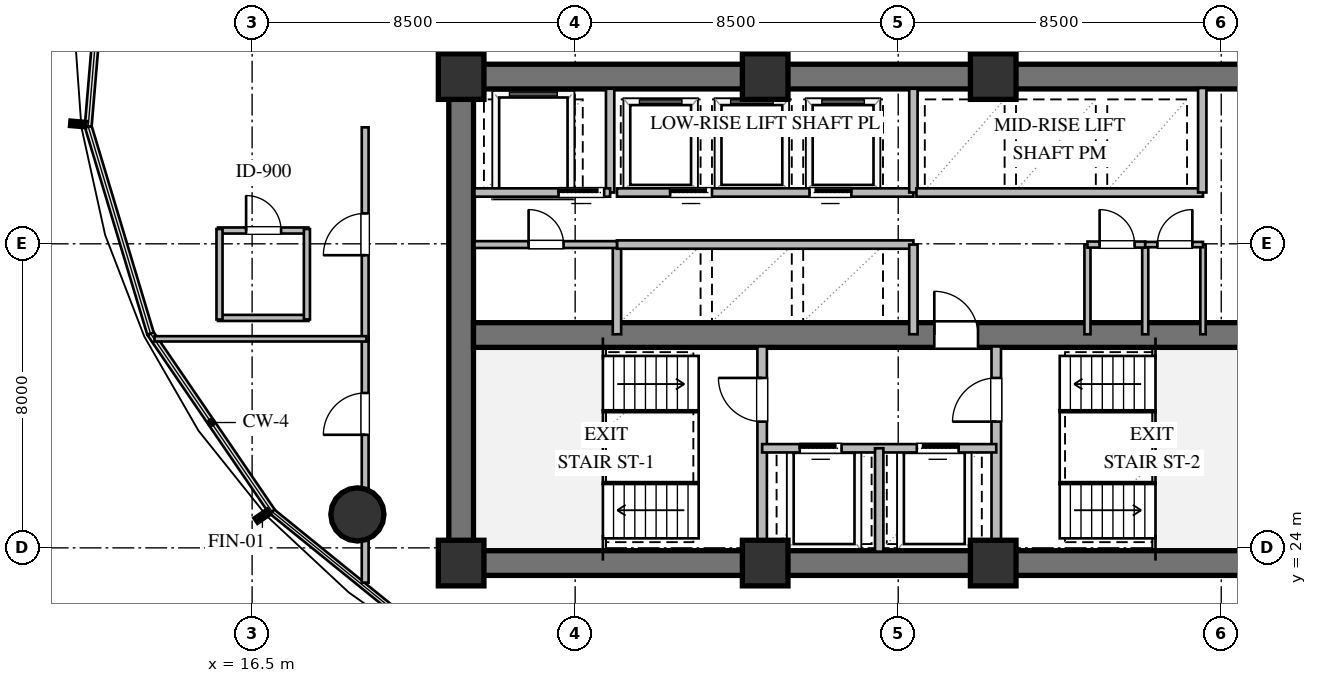
"""IFC4 building model, lengths in metres.
Left out: names, types, materials, properties, quantities, classifications, styles, units other than length and angle.
Written with IfcOpenShell. Run it as: python <this file> out.ifc"""

import sys

from ifc_helpers import new_model, si_unit, direction, frame, frame_2d, origin, origin_2d, place, context, subcontext, project, spatial, rectangle, circle, extrude, element, fill, save


model = new_model("IFC4")
c1 = context("Model", 3, precision=1e-05, world=origin(), true_north=direction((0.0, 1.0)))
c2 = subcontext(c1, "Body", "Model", "MODEL_VIEW")
j1 = project(units=[si_unit("LENGTHUNIT", "METRE"), si_unit("PLANEANGLEUNIT", "RADIAN")], contexts=[c1])
p1 = place(None, origin())
s1 = spatial("IfcSite", under=j1, at=p1, CompositionType="ELEMENT")
p2 = place(p1, origin())
s2 = spatial("IfcBuilding", under=s1, at=p2, CompositionType="ELEMENT")
p3 = place(p2, frame((0.0, 0.0, 74.4)))
s3 = spatial("IfcBuildingStorey", under=s2, at=p3, CompositionType="ELEMENT", Elevation=74.4)
for number, where, z_axis, x_axis in (
    (1, (21.675, 23.6, 0.0), (0.0, 0.0, 1.0), (1.0, 0.0, 0.0)),
    (2, (21.675, 36.4, 0.0), (0.0, 0.0, 1.0), (1.0, 0.0, 0.0)),
):
    element("IfcWall", number, at=place(p3, frame(where, z_axis=z_axis, x_axis=x_axis)), inside=s3, PredefinedType="SHEAR", context=c2, shape_type="SweptSolid", body=[
        extrude(rectangle(XDim=22.65, YDim=0.65, at=frame_2d((11.325, 0.0))), origin(), (0.0, 0.0, 1.0), 3.36),
    ])
p4 = place(p3, frame((22.0, 23.925, 0.0), z_axis=(0.0, 0.0, 1.0), x_axis=(0.0, 1.0, 0.0)))
e3 = element("IfcWall", 3, at=p4, inside=s3, PredefinedType="SHEAR", context=c2, shape_type="SweptSolid", body=[
    extrude(rectangle(XDim=12.15, YDim=0.65, at=frame_2d((6.075, 0.0))), origin(), (0.0, 0.0, 1.0), 3.36),
])
p5 = place(p3, frame((22.325, 29.6, 0.0), z_axis=(0.0, 0.0, 1.0), x_axis=(1.0, 0.0, 0.0)))
e4 = element("IfcWall", 4, at=p5, inside=s3, PredefinedType="SHEAR", context=c2, shape_type="SweptSolid", body=[
    extrude(rectangle(XDim=21.35, YDim=0.65, at=frame_2d((10.675, 0.0))), origin(), (0.0, 0.0, 1.0), 3.36),
])
p6 = place(p5, frame((12.125, 0.0, 0.0)))
e5 = element("IfcOpeningElement", 5, at=p6, cuts=e4, PredefinedType="OPENING", context=c2, shape_type="SweptSolid", body=[
    extrude(rectangle(XDim=1.15, YDim=2.1, at=frame_2d((0.575, 1.05))), frame((0.0, 0.335, 0.0), z_axis=(0.0, -1.0, 0.0), x_axis=(1.0, 0.0, 0.0)), (0.0, 0.0, 1.0), 0.67),
])
for number, where, z_axis, x_axis in (
    (6, (22.0, 23.6, 0.0), (0.0, 0.0, 1.0), (1.0, 0.0, 0.0)),
    (7, (30.0, 23.6, 0.0), (0.0, 0.0, 1.0), (1.0, 0.0, 0.0)),
    (8, (36.0, 23.6, 0.0), (0.0, 0.0, 1.0), (1.0, 0.0, 0.0)),
    (9, (36.0, 36.4, 0.0), (0.0, 0.0, 1.0), (1.0, 0.0, 0.0)),
    (10, (30.0, 36.4, 0.0), (0.0, 0.0, 1.0), (1.0, 0.0, 0.0)),
    (11, (22.0, 36.4, 0.0), (0.0, 0.0, 1.0), (1.0, 0.0, 0.0)),
):
    element("IfcColumn", number, at=place(p3, frame(where, z_axis=z_axis, x_axis=x_axis)), inside=s3, PredefinedType="COLUMN", context=c2, shape_type="SweptSolid", body=[
        extrude(rectangle(XDim=1.2, YDim=1.2, at=origin_2d()), origin(), (0.0, 0.0, 1.0), 3.6),
    ])
p7 = place(p3, frame((19.27, 24.88, 0.0), z_axis=(0.0, 0.0, 1.0), x_axis=(1.0, 0.0, 0.0)))
e12 = element("IfcColumn", 12, at=p7, inside=s3, PredefinedType="COLUMN", context=c2, shape_type="SweptSolid", body=[
    extrude(circle(Radius=0.7, at=origin_2d()), origin(), (0.0, 0.0, 1.0), 3.6),
])
p8 = place(p3, frame((29.92, 23.9, 0.0), z_axis=(0.0, 0.0, 1.0), x_axis=(0.0, 1.0, 0.0)))
e13 = element("IfcWall", 13, at=p8, inside=s3, PredefinedType="SOLIDWALL", context=c2, shape_type="SweptSolid", body=[
    extrude(rectangle(XDim=5.4, YDim=0.25, at=frame_2d((2.7, 0.0))), origin(), (0.0, 0.0, 1.0), 3.36),
])
p9 = place(p8, frame((3.421, 0.0, 0.0)))
e14 = element("IfcOpeningElement", 14, at=p9, cuts=e13, PredefinedType="OPENING", context=c2, shape_type="SweptSolid", body=[
    extrude(rectangle(XDim=1.15, YDim=2.1, at=frame_2d((0.575, 1.05))), frame((0.0, 0.135, 0.0), z_axis=(0.0, -1.0, 0.0), x_axis=(1.0, 0.0, 0.0)), (0.0, 0.0, 1.0), 0.27),
])
p10 = place(p3, frame((36.08, 23.9, 0.0), z_axis=(0.0, 0.0, 1.0), x_axis=(0.0, 1.0, 0.0)))
e15 = element("IfcWall", 15, at=p10, inside=s3, PredefinedType="SOLIDWALL", context=c2, shape_type="SweptSolid", body=[
    extrude(rectangle(XDim=5.4, YDim=0.25, at=frame_2d((2.7, 0.0))), origin(), (0.0, 0.0, 1.0), 3.36),
])
p11 = place(p10, frame((3.421, 0.0, 0.0)))
e16 = element("IfcOpeningElement", 16, at=p11, cuts=e15, PredefinedType="OPENING", context=c2, shape_type="SweptSolid", body=[
    extrude(rectangle(XDim=1.15, YDim=2.1, at=frame_2d((0.575, 1.05))), frame((0.0, 0.135, 0.0), z_axis=(0.0, -1.0, 0.0), x_axis=(1.0, 0.0, 0.0)), (0.0, 0.0, 1.0), 0.27),
])
p12 = place(p3, frame((29.92, 26.62, 0.0), z_axis=(0.0, 0.0, 1.0), x_axis=(1.0, 0.0, 0.0)))
e17 = element("IfcWall", 17, at=p12, inside=s3, PredefinedType="SOLIDWALL", context=c2, shape_type="SweptSolid", body=[
    extrude(rectangle(XDim=6.16, YDim=0.22, at=frame_2d((3.08, 0.0))), origin(), (0.0, 0.0, 1.0), 3.36),
])
p13 = place(p12, frame((0.99, 0.0, 0.0)))
e18 = element("IfcOpeningElement", 18, at=p13, cuts=e17, PredefinedType="OPENING", context=c2, shape_type="SweptSolid", body=[
    extrude(rectangle(XDim=1.1, YDim=2.1, at=frame_2d((0.55, 1.05))), frame((0.0, 0.12, 0.0), z_axis=(0.0, -1.0, 0.0), x_axis=(1.0, 0.0, 0.0)), (0.0, 0.0, 1.0), 0.24),
])
p14 = place(p12, frame((4.07, 0.0, 0.0)))
e19 = element("IfcOpeningElement", 19, at=p14, cuts=e17, PredefinedType="OPENING", context=c2, shape_type="SweptSolid", body=[
    extrude(rectangle(XDim=1.1, YDim=2.1, at=frame_2d((0.55, 1.05))), frame((0.0, 0.12, 0.0), z_axis=(0.0, -1.0, 0.0), x_axis=(1.0, 0.0, 0.0)), (0.0, 0.0, 1.0), 0.24),
])
p15 = place(p3, frame((33.0, 23.9, 0.0), z_axis=(0.0, 0.0, 1.0), x_axis=(0.0, 1.0, 0.0)))
e20 = element("IfcWall", 20, at=p15, inside=s3, PredefinedType="SOLIDWALL", context=c2, shape_type="SweptSolid", body=[
    extrude(rectangle(XDim=2.72, YDim=0.22, at=frame_2d((1.36, 0.0))), origin(), (0.0, 0.0, 1.0), 3.36),
])
p16 = place(p3, frame((25.92, 33.35, 0.0), z_axis=(0.0, 0.0, 1.0), x_axis=(0.0, 1.0, 0.0)))
e21 = element("IfcWall", 21, at=p16, inside=s3, PredefinedType="SOLIDWALL", context=c2, shape_type="SweptSolid", body=[
    extrude(rectangle(XDim=2.73, YDim=0.22, at=frame_2d((1.365, 0.0))), origin(), (0.0, 0.0, 1.0), 3.36),
])
p17 = place(p3, frame((22.35, 33.35, 0.0), z_axis=(0.0, 0.0, 1.0), x_axis=(1.0, 0.0, 0.0)))
e22 = element("IfcWall", 22, at=p17, inside=s3, PredefinedType="SOLIDWALL", context=c2, shape_type="SweptSolid", body=[
    extrude(rectangle(XDim=3.57, YDim=0.22, at=frame_2d((1.785, 0.0))), origin(), (0.0, 0.0, 1.0), 3.36),
])
p18 = place(p17, frame((2.213, 0.0, 0.0)))
e23 = element("IfcOpeningElement", 23, at=p18, cuts=e22, PredefinedType="OPENING", context=c2, shape_type="SweptSolid", body=[
    extrude(rectangle(XDim=1.2, YDim=2.1, at=frame_2d((0.6, 1.05))), frame((0.0, 0.12, 0.0), z_axis=(0.0, -1.0, 0.0), x_axis=(1.0, 0.0, 0.0)), (0.0, 0.0, 1.0), 0.24),
])
p19 = place(p3, frame((26.1, 29.62, 0.0), z_axis=(0.0, 0.0, 1.0), x_axis=(0.0, 1.0, 0.0)))
e24 = element("IfcWall", 24, at=p19, inside=s3, PredefinedType="SOLIDWALL", context=c2, shape_type="SweptSolid", body=[
    extrude(rectangle(XDim=2.36, YDim=0.22, at=frame_2d((1.18, 0.0))), origin(), (0.0, 0.0, 1.0), 3.36),
])
p20 = place(p3, frame((26.1, 31.98, 0.0), z_axis=(0.0, 0.0, 1.0), x_axis=(1.0, 0.0, 0.0)))
e25 = element("IfcWall", 25, at=p20, inside=s3, PredefinedType="SOLIDWALL", context=c2, shape_type="SweptSolid", body=[
    extrude(rectangle(XDim=7.8, YDim=0.22, at=frame_2d((3.9, 0.0))), origin(), (0.0, 0.0, 1.0), 3.36),
])
p21 = place(p3, frame((33.9, 29.62, 0.0), z_axis=(0.0, 0.0, 1.0), x_axis=(0.0, 1.0, 0.0)))
e26 = element("IfcWall", 26, at=p21, inside=s3, PredefinedType="SOLIDWALL", context=c2, shape_type="SweptSolid", body=[
    extrude(rectangle(XDim=2.36, YDim=0.22, at=frame_2d((1.18, 0.0))), origin(), (0.0, 0.0, 1.0), 3.36),
])
p22 = place(p3, frame((26.1, 33.35, 0.0), z_axis=(0.0, 0.0, 1.0), x_axis=(1.0, 0.0, 0.0)))
e27 = element("IfcWall", 27, at=p22, inside=s3, PredefinedType="SOLIDWALL", context=c2, shape_type="SweptSolid", body=[
    extrude(rectangle(XDim=7.8, YDim=0.22, at=frame_2d((3.9, 0.0))), origin(), (0.0, 0.0, 1.0), 3.36),
])
p23 = place(p22, frame((1.4, 0.0, 0.0)))
e28 = element("IfcOpeningElement", 28, at=p23, cuts=e27, PredefinedType="OPENING", context=c2, shape_type="SweptSolid", body=[
    extrude(rectangle(XDim=1.1, YDim=2.1, at=frame_2d((0.55, 1.05))), frame((0.0, 0.12, 0.0), z_axis=(0.0, -1.0, 0.0), x_axis=(1.0, 0.0, 0.0)), (0.0, 0.0, 1.0), 0.24),
])
p24 = place(p22, frame((5.066, 0.0, 0.0)))
e29 = element("IfcOpeningElement", 29, at=p24, cuts=e27, PredefinedType="OPENING", context=c2, shape_type="SweptSolid", body=[
    extrude(rectangle(XDim=1.1, YDim=2.1, at=frame_2d((0.55, 1.05))), frame((0.0, 0.12, 0.0), z_axis=(0.0, -1.0, 0.0), x_axis=(1.0, 0.0, 0.0)), (0.0, 0.0, 1.0), 0.24),
])
p25 = place(p3, frame((33.9, 33.35, 0.0), z_axis=(0.0, 0.0, 1.0), x_axis=(0.0, 1.0, 0.0)))
e30 = element("IfcWall", 30, at=p25, inside=s3, PredefinedType="SOLIDWALL", context=c2, shape_type="SweptSolid", body=[
    extrude(rectangle(XDim=2.73, YDim=0.22, at=frame_2d((1.365, 0.0))), origin(), (0.0, 0.0, 1.0), 3.36),
])
p26 = place(p3, frame((33.98, 33.35, 0.0), z_axis=(0.0, 0.0, 1.0), x_axis=(1.0, 0.0, 0.0)))
e31 = element("IfcWall", 31, at=p26, inside=s3, PredefinedType="SOLIDWALL", context=c2, shape_type="SweptSolid", body=[
    extrude(rectangle(XDim=7.54, YDim=0.22, at=frame_2d((3.77, 0.0))), origin(), (0.0, 0.0, 1.0), 3.36),
])
p27 = place(p3, frame((41.5, 33.35, 0.0), z_axis=(0.0, 0.0, 1.0), x_axis=(0.0, 1.0, 0.0)))
e32 = element("IfcWall", 32, at=p27, inside=s3, PredefinedType="SOLIDWALL", context=c2, shape_type="SweptSolid", body=[
    extrude(rectangle(XDim=2.75, YDim=0.22, at=frame_2d((1.375, 0.0))), origin(), (0.0, 0.0, 1.0), 3.36),
])
p28 = place(p3, frame((22.35, 31.98, 0.0), z_axis=(0.0, 0.0, 1.0), x_axis=(1.0, 0.0, 0.0)))
e33 = element("IfcWall", 33, at=p28, inside=s3, PredefinedType="PARTITIONING", context=c2, shape_type="SweptSolid", body=[
    extrude(rectangle(XDim=3.75, YDim=0.18, at=frame_2d((1.875, 0.0))), origin(), (0.0, 0.0, 1.0), 3.36),
])
p29 = place(p28, frame((1.425, 0.0, 0.0)))
e34 = element("IfcOpeningElement", 34, at=p29, cuts=e33, PredefinedType="OPENING", context=c2, shape_type="SweptSolid", body=[
    extrude(rectangle(XDim=0.92, YDim=2.1, at=frame_2d((0.46, 1.05))), frame((0.0, 0.1, 0.0), z_axis=(0.0, -1.0, 0.0), x_axis=(1.0, 0.0, 0.0)), (0.0, 0.0, 1.0), 0.2),
])
for number, where, z_axis, x_axis in (
    (35, (38.48, 29.62, 0.0), (0.0, 0.0, 1.0), (0.0, 1.0, 0.0)),
    (36, (40.0, 29.62, 0.0), (0.0, 0.0, 1.0), (0.0, 1.0, 0.0)),
):
    element("IfcWall", number, at=place(p3, frame(where, z_axis=z_axis, x_axis=x_axis)), inside=s3, PredefinedType="PLUMBINGWALL", context=c2, shape_type="SweptSolid", body=[
        extrude(rectangle(XDim=2.36, YDim=0.16, at=frame_2d((1.18, 0.0))), origin(), (0.0, 0.0, 1.0), 3.36),
    ])
p30 = place(p3, frame((41.52, 29.62, 0.0), z_axis=(0.0, 0.0, 1.0), x_axis=(0.0, 1.0, 0.0)))
e37 = element("IfcWall", 37, at=p30, inside=s3, PredefinedType="PARTITIONING", context=c2, shape_type="SweptSolid", body=[
    extrude(rectangle(XDim=2.36, YDim=0.14, at=frame_2d((1.18, 0.0))), origin(), (0.0, 0.0, 1.0), 3.36),
])
p31 = place(p3, frame((38.48, 31.98, 0.0), z_axis=(0.0, 0.0, 1.0), x_axis=(1.0, 0.0, 0.0)))
e38 = element("IfcWall", 38, at=p31, inside=s3, PredefinedType="PLUMBINGWALL", context=c2, shape_type="SweptSolid", body=[
    extrude(rectangle(XDim=1.52, YDim=0.16, at=frame_2d((0.76, 0.0))), origin(), (0.0, 0.0, 1.0), 3.36),
])
p32 = place(p31, frame((0.32, 0.0, 0.0)))
e39 = element("IfcOpeningElement", 39, at=p32, cuts=e38, PredefinedType="OPENING", context=c2, shape_type="SweptSolid", body=[
    extrude(rectangle(XDim=0.92, YDim=2.1, at=frame_2d((0.46, 1.05))), frame((0.0, 0.09, 0.0), z_axis=(0.0, -1.0, 0.0), x_axis=(1.0, 0.0, 0.0)), (0.0, 0.0, 1.0), 0.18),
])
p33 = place(p3, frame((40.0, 31.98, 0.0), z_axis=(0.0, 0.0, 1.0), x_axis=(1.0, 0.0, 0.0)))
e40 = element("IfcWall", 40, at=p33, inside=s3, PredefinedType="PARTITIONING", context=c2, shape_type="SweptSolid", body=[
    extrude(rectangle(XDim=1.52, YDim=0.14, at=frame_2d((0.76, 0.0))), origin(), (0.0, 0.0, 1.0), 3.36),
])
p34 = place(p33, frame((0.32, 0.0, 0.0)))
e41 = element("IfcOpeningElement", 41, at=p34, cuts=e40, PredefinedType="OPENING", context=c2, shape_type="SweptSolid", body=[
    extrude(rectangle(XDim=0.92, YDim=2.1, at=frame_2d((0.46, 1.05))), frame((0.0, 0.08, 0.0), z_axis=(0.0, -1.0, 0.0), x_axis=(1.0, 0.0, 0.0)), (0.0, 0.0, 1.0), 0.16),
])
p35 = place(p3, frame((15.602, 30.05, 0.0), z_axis=(0.0, 0.0, 1.0), x_axis=(1.0, 0.0, 0.0)))
e42 = element("IfcWall", 42, at=p35, inside=s3, PredefinedType="PLUMBINGWALL", context=c2, shape_type="SweptSolid", body=[
    extrude(rectangle(XDim=2.38, YDim=0.16, at=frame_2d((1.19, 0.0))), origin(), (0.0, 0.0, 1.0), 3.36),
])
p36 = place(p3, frame((15.602, 32.35, 0.0), z_axis=(0.0, 0.0, 1.0), x_axis=(1.0, 0.0, 0.0)))
e43 = element("IfcWall", 43, at=p36, inside=s3, PredefinedType="PLUMBINGWALL", context=c2, shape_type="SweptSolid", body=[
    extrude(rectangle(XDim=2.38, YDim=0.16, at=frame_2d((1.19, 0.0))), origin(), (0.0, 0.0, 1.0), 3.36),
])
p37 = place(p36, frame((0.74, 0.0, 0.0)))
e44 = element("IfcOpeningElement", 44, at=p37, cuts=e43, PredefinedType="OPENING", context=c2, shape_type="SweptSolid", body=[
    extrude(rectangle(XDim=0.92, YDim=2.1, at=frame_2d((0.46, 1.05))), frame((0.0, 0.09, 0.0), z_axis=(0.0, -1.0, 0.0), x_axis=(1.0, 0.0, 0.0)), (0.0, 0.0, 1.0), 0.18),
])
p38 = place(p3, frame((15.642, 30.01, 0.0), z_axis=(0.0, 0.0, 1.0), x_axis=(0.0, 1.0, 0.0)))
e45 = element("IfcWall", 45, at=p38, inside=s3, PredefinedType="PLUMBINGWALL", context=c2, shape_type="SweptSolid", body=[
    extrude(rectangle(XDim=2.38, YDim=0.16, at=frame_2d((1.19, 0.0))), origin(), (0.0, 0.0, 1.0), 3.36),
])
p39 = place(p3, frame((17.942, 30.01, 0.0), z_axis=(0.0, 0.0, 1.0), x_axis=(0.0, 1.0, 0.0)))
e46 = element("IfcWall", 46, at=p39, inside=s3, PredefinedType="PLUMBINGWALL", context=c2, shape_type="SweptSolid", body=[
    extrude(rectangle(XDim=2.38, YDim=0.16, at=frame_2d((1.19, 0.0))), origin(), (0.0, 0.0, 1.0), 2.738),
])
p40 = place(p3, frame((19.475, 23.085, 0.0), z_axis=(0.0, 0.0, 1.0), x_axis=(0.0, 1.0, 0.0)))
e47 = element("IfcWall", 47, at=p40, inside=s3, PredefinedType="PARTITIONING", context=c2, shape_type="SweptSolid", body=[
    extrude(rectangle(XDim=6.48, YDim=0.18, at=frame_2d((3.24, 0.0))), origin(), (0.0, 0.0, 1.0), 2.738),
])
p41 = place(p40, frame((3.89, 0.0, 0.0)))
e48 = element("IfcOpeningElement", 48, at=p41, cuts=e47, PredefinedType="OPENING", context=c2, shape_type="SweptSolid", body=[
    extrude(rectangle(XDim=1.1, YDim=2.1, at=frame_2d((0.55, 1.05))), frame((0.0, 0.1, 0.0), z_axis=(0.0, -1.0, 0.0), x_axis=(1.0, 0.0, 0.0)), (0.0, 0.0, 1.0), 0.2),
])
p42 = place(p3, frame((19.475, 29.435, 0.0), z_axis=(0.0, 0.0, 1.0), x_axis=(0.0, 1.0, 0.0)))
e49 = element("IfcWall", 49, at=p42, inside=s3, PredefinedType="PARTITIONING", context=c2, shape_type="SweptSolid", body=[
    extrude(rectangle(XDim=5.63, YDim=0.18, at=frame_2d((2.815, 0.0))), origin(), (0.0, 0.0, 1.0), 3.36),
])
p43 = place(p42, frame((2.265, 0.0, 0.0)))
e50 = element("IfcOpeningElement", 50, at=p43, cuts=e49, PredefinedType="OPENING", context=c2, shape_type="SweptSolid", body=[
    extrude(rectangle(XDim=1.1, YDim=2.1, at=frame_2d((0.55, 1.05))), frame((0.0, 0.1, 0.0), z_axis=(0.0, -1.0, 0.0), x_axis=(1.0, 0.0, 0.0)), (0.0, 0.0, 1.0), 0.2),
])
p44 = place(p3, frame((13.931, 29.5, 0.0), z_axis=(0.0, 0.0, 1.0), x_axis=(1.0, 0.0, 0.0)))
e51 = element("IfcWall", 51, at=p44, inside=s3, PredefinedType="PARTITIONING", context=c2, shape_type="SweptSolid", body=[
    extrude(rectangle(XDim=5.574, YDim=0.14, at=frame_2d((2.787, 0.0))), origin(), (0.0, 0.0, 1.0), 3.36),
])
p45 = place(p9, origin())
e52 = element("IfcDoor", 52, at=p45, inside=s3, OperationType="SINGLE_SWING_RIGHT", PredefinedType="DOOR", context=c2, shape_type="SweptSolid", body=[
    extrude(rectangle(XDim=1.15, YDim=2.1, at=frame_2d((0.575, 1.05))), frame((0.0, 0.025, 0.0), z_axis=(0.0, -1.0, 0.0), x_axis=(1.0, 0.0, 0.0)), (0.0, 0.0, 1.0), 0.05),
])
fill(e14, e52)
p46 = place(p11, origin())
e53 = element("IfcDoor", 53, at=p46, inside=s3, OperationType="SINGLE_SWING_LEFT", PredefinedType="DOOR", context=c2, shape_type="SweptSolid", body=[
    extrude(rectangle(XDim=1.15, YDim=2.1, at=frame_2d((0.575, 1.05))), frame((0.0, 0.025, 0.0), z_axis=(0.0, -1.0, 0.0), x_axis=(1.0, 0.0, 0.0)), (0.0, 0.0, 1.0), 0.05),
])
fill(e16, e53)
p47 = place(p13, origin())
e54 = element("IfcDoor", 54, at=p47, inside=s3, OperationType="SLIDING_TO_LEFT", PredefinedType="DOOR", context=c2, shape_type="SweptSolid", body=[
    extrude(rectangle(XDim=1.1, YDim=2.1, at=frame_2d((0.55, 1.05))), frame((0.0, 0.025, 0.0), z_axis=(0.0, -1.0, 0.0), x_axis=(1.0, 0.0, 0.0)), (0.0, 0.0, 1.0), 0.05),
])
fill(e18, e54)
p48 = place(p14, origin())
e55 = element("IfcDoor", 55, at=p48, inside=s3, OperationType="SLIDING_TO_RIGHT", PredefinedType="DOOR", context=c2, shape_type="SweptSolid", body=[
    extrude(rectangle(XDim=1.1, YDim=2.1, at=frame_2d((0.55, 1.05))), frame((0.0, 0.025, 0.0), z_axis=(0.0, -1.0, 0.0), x_axis=(1.0, 0.0, 0.0)), (0.0, 0.0, 1.0), 0.05),
])
fill(e19, e55)
p49 = place(p6, origin())
e56 = element("IfcDoor", 56, at=p49, inside=s3, OperationType="SINGLE_SWING_LEFT", PredefinedType="DOOR", context=c2, shape_type="SweptSolid", body=[
    extrude(rectangle(XDim=1.15, YDim=2.1, at=frame_2d((0.575, 1.05))), frame((0.0, 0.025, 0.0), z_axis=(0.0, -1.0, 0.0), x_axis=(1.0, 0.0, 0.0)), (0.0, 0.0, 1.0), 0.05),
])
fill(e5, e56)
p50 = place(p18, origin())
e57 = element("IfcDoor", 57, at=p50, inside=s3, OperationType="SLIDING_TO_LEFT", PredefinedType="DOOR", context=c2, shape_type="SweptSolid", body=[
    extrude(rectangle(XDim=1.2, YDim=2.1, at=frame_2d((0.6, 1.05))), frame((0.0, 0.025, 0.0), z_axis=(0.0, -1.0, 0.0), x_axis=(1.0, 0.0, 0.0)), (0.0, 0.0, 1.0), 0.05),
])
fill(e23, e57)
p51 = place(p23, origin())
e58 = element("IfcDoor", 58, at=p51, inside=s3, OperationType="SLIDING_TO_LEFT", PredefinedType="DOOR", context=c2, shape_type="SweptSolid", body=[
    extrude(rectangle(XDim=1.1, YDim=2.1, at=frame_2d((0.55, 1.05))), frame((0.0, 0.025, 0.0), z_axis=(0.0, -1.0, 0.0), x_axis=(1.0, 0.0, 0.0)), (0.0, 0.0, 1.0), 0.05),
])
fill(e28, e58)
p52 = place(p24, origin())
e59 = element("IfcDoor", 59, at=p52, inside=s3, OperationType="SLIDING_TO_RIGHT", PredefinedType="DOOR", context=c2, shape_type="SweptSolid", body=[
    extrude(rectangle(XDim=1.1, YDim=2.1, at=frame_2d((0.55, 1.05))), frame((0.0, 0.025, 0.0), z_axis=(0.0, -1.0, 0.0), x_axis=(1.0, 0.0, 0.0)), (0.0, 0.0, 1.0), 0.05),
])
fill(e29, e59)
p53 = place(p29, origin())
e60 = element("IfcDoor", 60, at=p53, inside=s3, OperationType="SINGLE_SWING_LEFT", PredefinedType="DOOR", context=c2, shape_type="SweptSolid", body=[
    extrude(rectangle(XDim=0.92, YDim=2.1, at=frame_2d((0.46, 1.05))), frame((0.0, 0.025, 0.0), z_axis=(0.0, -1.0, 0.0), x_axis=(1.0, 0.0, 0.0)), (0.0, 0.0, 1.0), 0.05),
])
fill(e34, e60)
p54 = place(p32, origin())
e61 = element("IfcDoor", 61, at=p54, inside=s3, OperationType="SINGLE_SWING_LEFT", PredefinedType="DOOR", context=c2, shape_type="SweptSolid", body=[
    extrude(rectangle(XDim=0.92, YDim=2.1, at=frame_2d((0.46, 1.05))), frame((0.0, 0.025, 0.0), z_axis=(0.0, -1.0, 0.0), x_axis=(1.0, 0.0, 0.0)), (0.0, 0.0, 1.0), 0.05),
])
fill(e39, e61)
p55 = place(p34, origin())
e62 = element("IfcDoor", 62, at=p55, inside=s3, OperationType="SINGLE_SWING_RIGHT", PredefinedType="DOOR", context=c2, shape_type="SweptSolid", body=[
    extrude(rectangle(XDim=0.92, YDim=2.1, at=frame_2d((0.46, 1.05))), frame((0.0, 0.025, 0.0), z_axis=(0.0, -1.0, 0.0), x_axis=(1.0, 0.0, 0.0)), (0.0, 0.0, 1.0), 0.05),
])
fill(e41, e62)
p56 = place(p37, origin())
e63 = element("IfcDoor", 63, at=p56, inside=s3, OperationType="SINGLE_SWING_LEFT", PredefinedType="DOOR", context=c2, shape_type="SweptSolid", body=[
    extrude(rectangle(XDim=0.92, YDim=2.1, at=frame_2d((0.46, 1.05))), frame((0.0, 0.025, 0.0), z_axis=(0.0, -1.0, 0.0), x_axis=(1.0, 0.0, 0.0)), (0.0, 0.0, 1.0), 0.05),
])
fill(e44, e63)
p57 = place(p41, origin())
e64 = element("IfcDoor", 64, at=p57, inside=s3, OperationType="SINGLE_SWING_LEFT", PredefinedType="DOOR", context=c2, shape_type="SweptSolid", body=[
    extrude(rectangle(XDim=1.1, YDim=2.1, at=frame_2d((0.55, 1.05))), frame((0.0, 0.025, 0.0), z_axis=(0.0, -1.0, 0.0), x_axis=(1.0, 0.0, 0.0)), (0.0, 0.0, 1.0), 0.05),
])
fill(e48, e64)
p58 = place(p43, origin())
e65 = element("IfcDoor", 65, at=p58, inside=s3, OperationType="SINGLE_SWING_LEFT", PredefinedType="DOOR", context=c2, shape_type="SweptSolid", body=[
    extrude(rectangle(XDim=1.1, YDim=2.1, at=frame_2d((0.55, 1.05))), frame((0.0, 0.025, 0.0), z_axis=(0.0, -1.0, 0.0), x_axis=(1.0, 0.0, 0.0)), (0.0, 0.0, 1.0), 0.05),
])
fill(e50, e65)
save(model, sys.argv[1])
